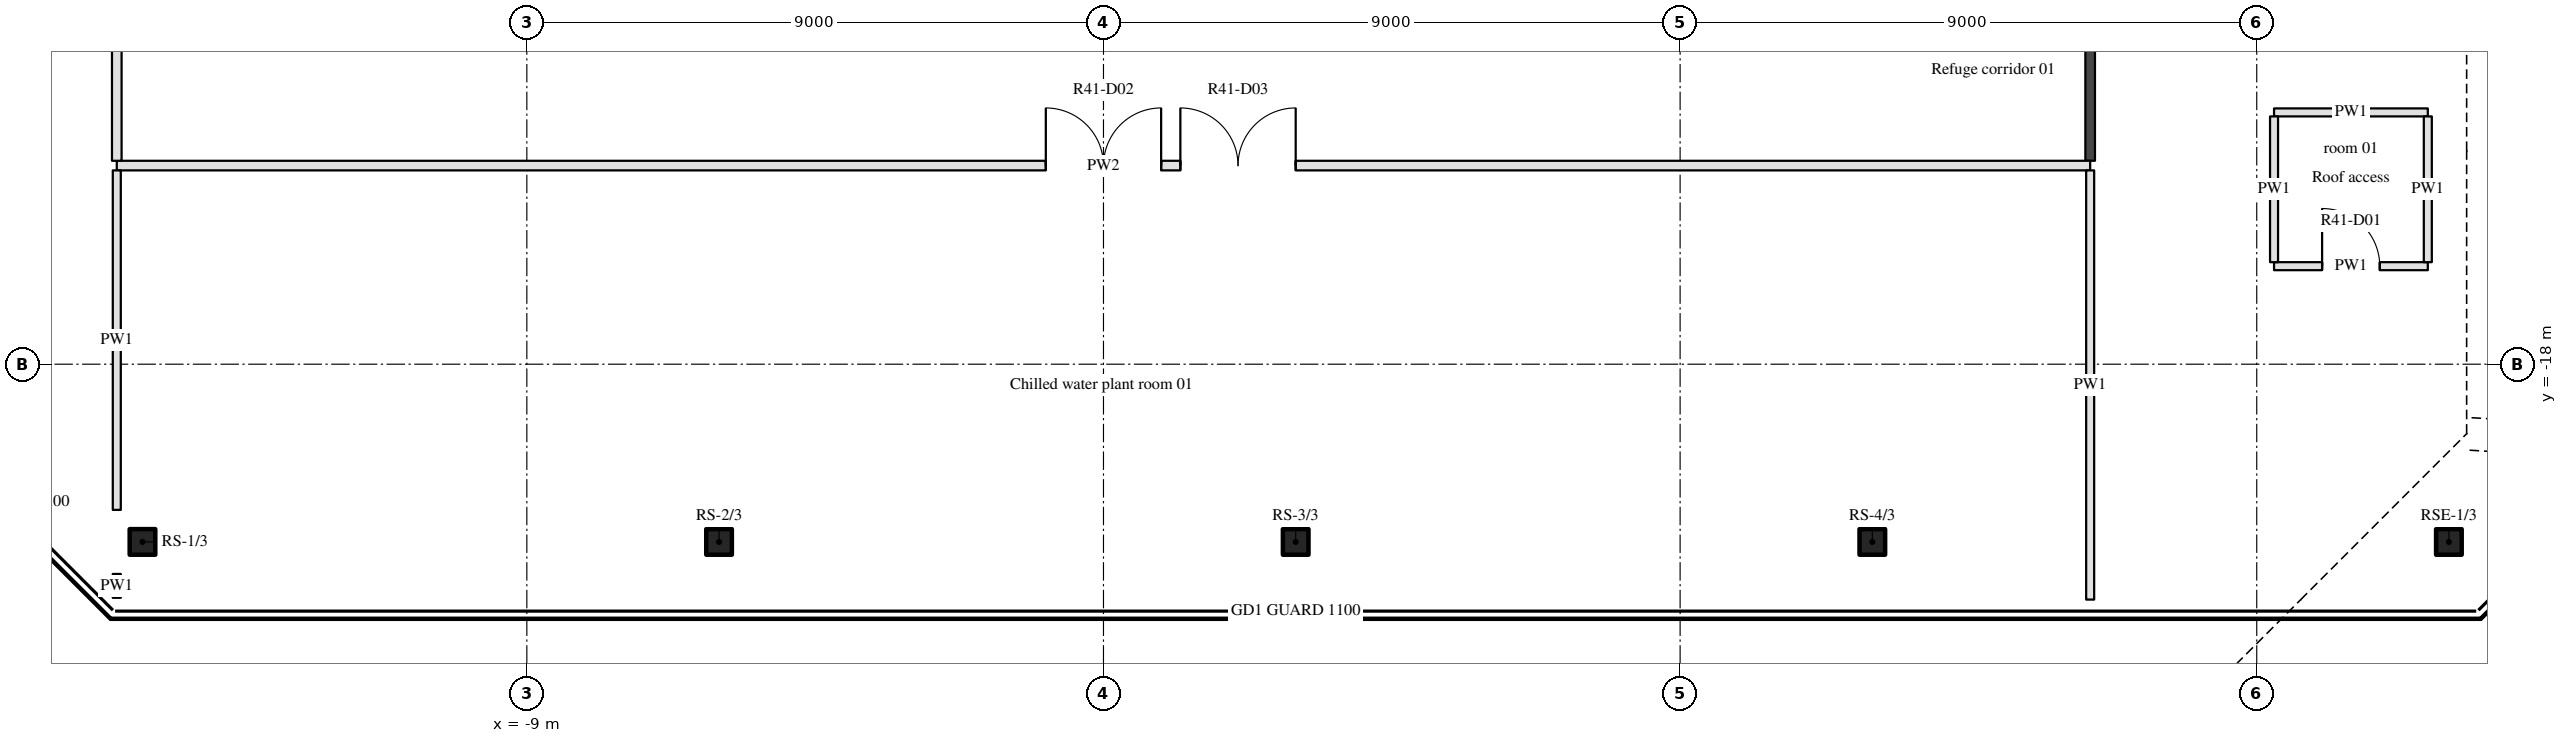
"""IFC4 building model, lengths in metres.
Left out: names, types, materials, properties, quantities, classifications, styles, units other than length and angle.
Written with IfcOpenShell. Run it as: python <this file> out.ifc"""

import sys

from ifc_helpers import new_model, si_unit, direction, frame, frame_2d, origin, origin_2d, place, context, subcontext, project, spatial, rectangle, hollow_rectangle, extrude, element, fill, save


model = new_model("IFC4")
c1 = context("Model", 3, precision=1e-05, world=origin(), true_north=direction((0.0, 1.0)))
c2 = subcontext(c1, "Body", "Model", "MODEL_VIEW")
j1 = project(units=[si_unit("LENGTHUNIT", "METRE"), si_unit("PLANEANGLEUNIT", "RADIAN")], contexts=[c1])
p1 = place(None, origin())
s1 = spatial("IfcSite", under=j1, at=p1, CompositionType="ELEMENT")
p2 = place(p1, origin())
s2 = spatial("IfcBuilding", under=s1, at=p2, CompositionType="ELEMENT")
p3 = place(p2, frame((0.0, 0.0, 167.7)))
s3 = spatial("IfcBuildingStorey", under=s2, at=p3, CompositionType="ELEMENT", Elevation=167.7)
for number, where, z_axis, x_axis in (
    (1, (-14.999, -20.774, 0.0), (0.0, 0.0, 1.0), (1.0, 0.0, 0.0)),
    (2, (-6.0, -20.774, 0.0), (0.0, 0.0, 1.0), (1.0, 0.0, 0.0)),
    (3, (3.0, -20.774, 0.0), (0.0, 0.0, 1.0), (1.0, 0.0, 0.0)),
    (4, (12.0, -20.774, 0.0), (0.0, 0.0, 1.0), (1.0, 0.0, 0.0)),
):
    element("IfcColumn", number, at=place(p3, frame(where, z_axis=z_axis, x_axis=x_axis)), inside=s3, PredefinedType="COLUMN", context=c2, shape_type="SweptSolid", body=[
        extrude(hollow_rectangle(XDim=0.4, YDim=0.4, WallThickness=0.02, InnerFilletRadius=0.03, OuterFilletRadius=0.05, at=origin_2d()), origin(), (0.0, 0.0, 1.0), 4.08),
    ])
p4 = place(p3, frame((20.999, -20.774, 0.0), z_axis=(0.0, 0.0, 1.0), x_axis=(1.0, 0.0, 0.0)))
e5 = element("IfcColumn", 5, at=p4, inside=s3, PredefinedType="COLUMN", context=c2, shape_type="SweptSolid", body=[
    extrude(hollow_rectangle(XDim=0.4, YDim=0.4, WallThickness=0.02, InnerFilletRadius=0.03, OuterFilletRadius=0.05, at=origin_2d()), origin(), (0.0, 0.0, 1.0), 4.25),
])
p5 = place(p3, frame((18.27, -16.47, 0.0), z_axis=(0.0, 0.0, 1.0), x_axis=(1.0, 0.0, 0.0)))
e6 = element("IfcWall", 6, at=p5, inside=s3, PredefinedType="PARTITIONING", context=c2, shape_type="SweptSolid", body=[
    extrude(rectangle(XDim=2.4, YDim=0.125, at=frame_2d((1.2, 0.0))), origin(), (0.0, 0.0, 1.0), 3.56),
])
p6 = place(p5, frame((0.75, 0.0, 0.0)))
e7 = element("IfcOpeningElement", 7, at=p6, cuts=e6, PredefinedType="OPENING", context=c2, shape_type="SweptSolid", body=[
    extrude(rectangle(XDim=0.9, YDim=2.1, at=frame_2d((0.45, 1.05))), frame((0.0, 0.073, 0.0), z_axis=(0.0, -1.0, 0.0), x_axis=(1.0, 0.0, 0.0)), (0.0, 0.0, 1.0), 0.145),
])
p7 = place(p3, frame((-15.4, -14.9, 0.0), z_axis=(0.0, 0.0, 1.0), x_axis=(1.0, 0.0, 0.0)))
e8 = element("IfcWall", 8, at=p7, inside=s3, PredefinedType="PARTITIONING", context=c2, shape_type="SweptSolid", body=[
    extrude(rectangle(XDim=30.8, YDim=0.15, at=frame_2d((15.4, 0.0))), origin(), (0.0, 0.0, 1.0), 3.56),
])
p8 = place(p7, frame((14.5, 0.0, 0.0)))
e9 = element("IfcOpeningElement", 9, at=p8, cuts=e8, PredefinedType="OPENING", context=c2, shape_type="SweptSolid", body=[
    extrude(rectangle(XDim=1.8, YDim=2.1, at=frame_2d((0.9, 1.05))), frame((0.0, 0.085, 0.0), z_axis=(0.0, -1.0, 0.0), x_axis=(1.0, 0.0, 0.0)), (0.0, 0.0, 1.0), 0.17),
])
p9 = place(p7, frame((16.6, 0.0, 0.0)))
e10 = element("IfcOpeningElement", 10, at=p9, cuts=e8, PredefinedType="OPENING", context=c2, shape_type="SweptSolid", body=[
    extrude(rectangle(XDim=1.8, YDim=2.1, at=frame_2d((0.9, 1.05))), frame((0.0, 0.085, 0.0), z_axis=(0.0, -1.0, 0.0), x_axis=(1.0, 0.0, 0.0)), (0.0, 0.0, 1.0), 0.17),
])
p10 = place(p3, frame((18.27, -14.07, 0.0), z_axis=(0.0, 0.0, 1.0), x_axis=(1.0, 0.0, 0.0)))
e11 = element("IfcWall", 11, at=p10, inside=s3, PredefinedType="PARTITIONING", context=c2, shape_type="SweptSolid", body=[
    extrude(rectangle(XDim=2.4, YDim=0.125, at=frame_2d((1.2, 0.0))), origin(), (0.0, 0.0, 1.0), 3.56),
])
p11 = place(p3, frame((-15.4, -21.646, 0.0), z_axis=(0.0, 0.0, 1.0), x_axis=(0.0, 1.0, 0.0)))
e12 = element("IfcWall", 12, at=p11, inside=s3, PredefinedType="PARTITIONING", context=c2, shape_type="SweptSolid", body=[
    extrude(rectangle(XDim=0.372, YDim=0.125, at=frame_2d((0.186, 0.0))), origin(), (0.0, 0.0, 1.0), 3.56),
])
p12 = place(p3, frame((-15.4, -20.274, 0.0), z_axis=(0.0, 0.0, 1.0), x_axis=(0.0, 1.0, 0.0)))
e13 = element("IfcWall", 13, at=p12, inside=s3, PredefinedType="PARTITIONING", context=c2, shape_type="SweptSolid", body=[
    extrude(rectangle(XDim=5.299, YDim=0.125, at=frame_2d((2.649, 0.0))), origin(), (0.0, 0.0, 1.0), 3.56),
])
p13 = place(p3, frame((-15.4, 8.35, 0.0), z_axis=(0.0, 0.0, 1.0), x_axis=(0.0, -1.0, 0.0)))
e14 = element("IfcWall", 14, at=p13, inside=s3, PredefinedType="PARTITIONING", context=c2, shape_type="SweptSolid", body=[
    extrude(rectangle(XDim=23.175, YDim=0.15, at=frame_2d((11.587, 0.0))), origin(), (0.0, 0.0, 1.0), 3.56),
])
p14 = place(p13, frame((11.712, 0.0, 0.0)))
e15 = element("IfcOpeningElement", 15, at=p14, cuts=e14, PredefinedType="OPENING", context=c2, shape_type="SweptSolid", body=[
    extrude(rectangle(XDim=1.8, YDim=2.1, at=frame_2d((0.9, 1.05))), frame((0.0, 0.085, 0.0), z_axis=(0.0, -1.0, 0.0), x_axis=(1.0, 0.0, 0.0)), (0.0, 0.0, 1.0), 0.17),
])
p15 = place(p13, frame((7.325, 0.0, 0.0)))
e16 = element("IfcOpeningElement", 16, at=p15, cuts=e14, PredefinedType="OPENING", context=c2, shape_type="SweptSolid", body=[
    extrude(rectangle(XDim=1.8, YDim=2.1, at=frame_2d((0.9, 1.05))), frame((0.0, 0.085, 0.0), z_axis=(0.0, -1.0, 0.0), x_axis=(1.0, 0.0, 0.0)), (0.0, 0.0, 1.0), 0.17),
])
p16 = place(p3, frame((15.4, -21.674, 0.0), z_axis=(0.0, 0.0, 1.0), x_axis=(0.0, 1.0, 0.0)))
e17 = element("IfcWall", 17, at=p16, inside=s3, PredefinedType="PARTITIONING", context=c2, shape_type="SweptSolid", body=[
    extrude(rectangle(XDim=6.699, YDim=0.125, at=frame_2d((3.35, 0.0))), origin(), (0.0, 0.0, 1.0), 3.56),
])
p17 = place(p3, frame((15.4, -14.825, 0.0), z_axis=(0.0, 0.0, 1.0), x_axis=(0.0, 1.0, 0.0)))
e18 = element("IfcWall", 18, at=p17, inside=s3, PredefinedType="PARTITIONING", context=c2, shape_type="SweptSolid", body=[
    extrude(rectangle(XDim=21.05, YDim=0.15, at=frame_2d((10.525, 0.0))), origin(), (0.0, 0.0, 1.0), 3.08),
])
p18 = place(p17, frame((9.625, 0.0, 0.0)))
e19 = element("IfcOpeningElement", 19, at=p18, cuts=e18, PredefinedType="OPENING", context=c2, shape_type="SweptSolid", body=[
    extrude(rectangle(XDim=1.8, YDim=2.1, at=frame_2d((0.9, 1.05))), frame((0.0, 0.085, 0.0), z_axis=(0.0, -1.0, 0.0), x_axis=(1.0, 0.0, 0.0)), (0.0, 0.0, 1.0), 0.17),
])
p19 = place(p17, frame((13.65, 0.0, 0.0)))
e20 = element("IfcOpeningElement", 20, at=p19, cuts=e18, PredefinedType="OPENING", context=c2, shape_type="SweptSolid", body=[
    extrude(rectangle(XDim=1.8, YDim=2.1, at=frame_2d((0.9, 1.05))), frame((0.0, 0.085, 0.0), z_axis=(0.0, -1.0, 0.0), x_axis=(1.0, 0.0, 0.0)), (0.0, 0.0, 1.0), 0.17),
])
for number, where, z_axis, x_axis in (
    (21, (18.27, -16.407, 0.0), (0.0, 0.0, 1.0), (0.0, 1.0, 0.0)),
    (22, (20.67, -16.407, 0.0), (0.0, 0.0, 1.0), (0.0, 1.0, 0.0)),
):
    element("IfcWall", number, at=place(p3, frame(where, z_axis=z_axis, x_axis=x_axis)), inside=s3, PredefinedType="PARTITIONING", context=c2, shape_type="SweptSolid", body=[
        extrude(rectangle(XDim=2.275, YDim=0.125, at=frame_2d((1.137, 0.0))), origin(), (0.0, 0.0, 1.0), 3.56),
    ])
p20 = place(p8, origin())
e23 = element("IfcDoor", 23, at=p20, inside=s3, OperationType="DOUBLE_DOOR_SINGLE_SWING", PredefinedType="DOOR", context=c2, shape_type="SweptSolid", body=[
    extrude(rectangle(XDim=1.8, YDim=2.1, at=frame_2d((0.9, 1.05))), frame((0.0, 0.025, 0.0), z_axis=(0.0, -1.0, 0.0), x_axis=(1.0, 0.0, 0.0)), (0.0, 0.0, 1.0), 0.05),
])
fill(e9, e23)
p21 = place(p9, origin())
e24 = element("IfcDoor", 24, at=p21, inside=s3, OperationType="DOUBLE_DOOR_SINGLE_SWING", PredefinedType="DOOR", context=c2, shape_type="SweptSolid", body=[
    extrude(rectangle(XDim=1.8, YDim=2.1, at=frame_2d((0.9, 1.05))), frame((0.0, 0.025, 0.0), z_axis=(0.0, -1.0, 0.0), x_axis=(1.0, 0.0, 0.0)), (0.0, 0.0, 1.0), 0.05),
])
fill(e10, e24)
p22 = place(p6, origin())
e25 = element("IfcDoor", 25, at=p22, inside=s3, OperationType="SINGLE_SWING_LEFT", PredefinedType="DOOR", context=c2, shape_type="SweptSolid", body=[
    extrude(rectangle(XDim=0.9, YDim=2.1, at=frame_2d((0.45, 1.05))), frame((0.0, 0.025, 0.0), z_axis=(0.0, -1.0, 0.0), x_axis=(1.0, 0.0, 0.0)), (0.0, 0.0, 1.0), 0.05),
])
fill(e7, e25)
save(model, sys.argv[1])
